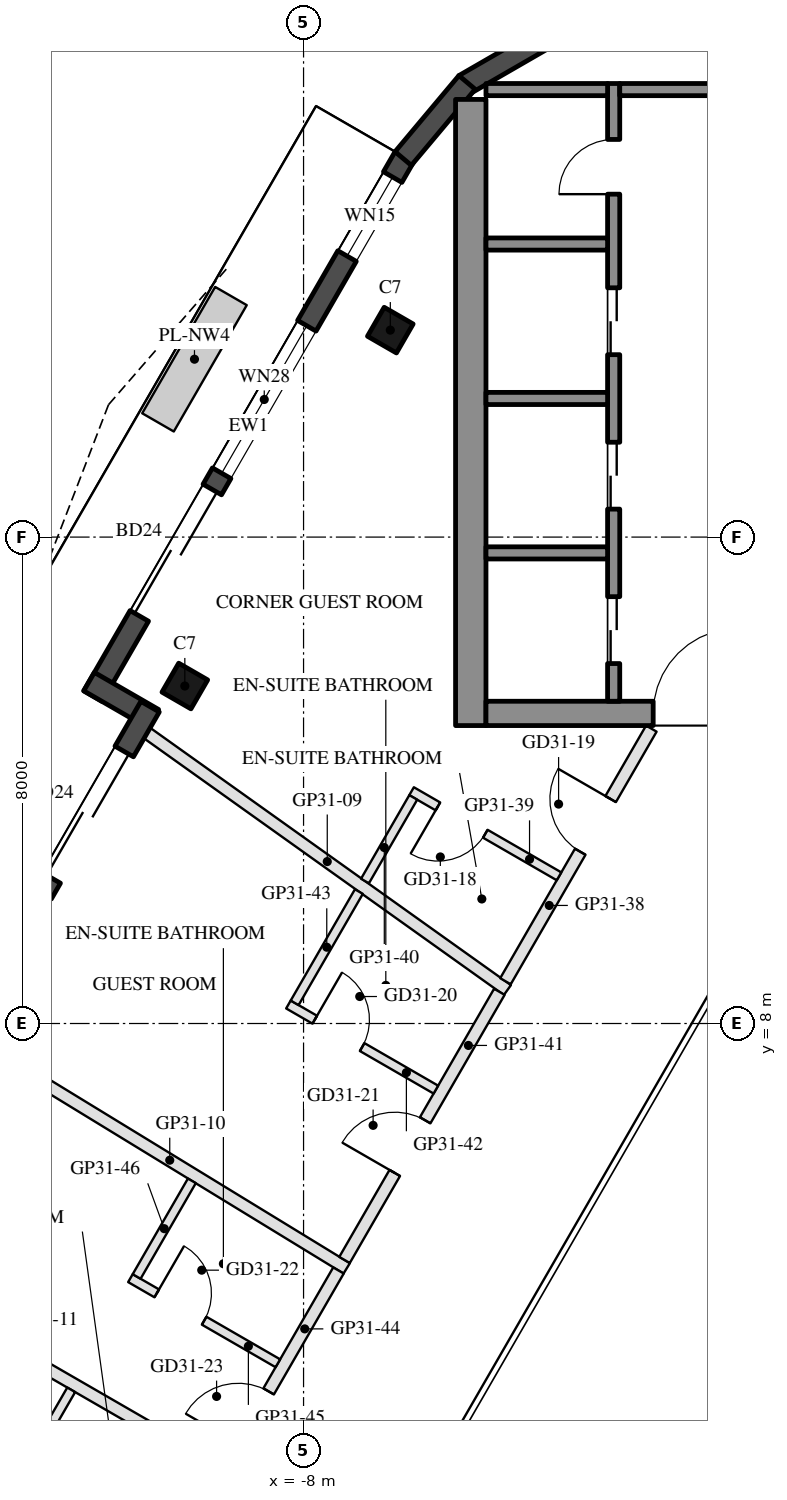
"""IFC4 building model, lengths in metres.
Left out: names, types, materials, properties, quantities, classifications, styles, units other than length and angle.
Written with IfcOpenShell. Run it as: python <this file> out.ifc"""

import sys

from ifc_helpers import new_model, si_unit, direction, frame, frame_2d, origin, origin_2d, place, context, subcontext, project, spatial, rectangle, hollow_rectangle, extrude, boolean, halfspace, element, fill, save


model = new_model("IFC4")
c1 = context("Model", 3, precision=1e-05, world=origin(), true_north=direction((0.0, 1.0)))
c2 = subcontext(c1, "Body", "Model", "MODEL_VIEW")
j1 = project(units=[si_unit("LENGTHUNIT", "METRE"), si_unit("PLANEANGLEUNIT", "RADIAN")], contexts=[c1])
p1 = place(None, origin())
s1 = spatial("IfcSite", under=j1, at=p1, CompositionType="ELEMENT")
p2 = place(p1, origin())
s2 = spatial("IfcBuilding", under=s1, at=p2, CompositionType="ELEMENT")
p3 = place(p2, frame((0.0, 0.0, 302.2)))
s3 = spatial("IfcBuildingStorey", under=s2, at=p3, CompositionType="ELEMENT", Elevation=302.2)
p4 = place(p3, frame((-6.573, 19.404, 0.0), z_axis=(0.0, 0.0, 1.0), x_axis=(0.5, 0.866025403784, 0.0)))
e1 = element("IfcColumn", 1, at=p4, inside=s3, PredefinedType="COLUMN", context=c2, shape_type="SweptSolid", body=[
    boolean("DIFFERENCE", extrude(hollow_rectangle(XDim=0.55, YDim=0.55, WallThickness=0.025, at=origin_2d()), origin(), (0.0, 0.0, 1.0), 3.7), halfspace(frame((0.0, 0.0, 0.04), z_axis=(0.0, 0.0, 1.0), x_axis=(1.0, 0.0, 0.0)), True)),
])
p5 = place(p3, frame((-9.953, 13.551, 0.0), z_axis=(0.0, 0.0, 1.0), x_axis=(0.5, 0.866025403784, 0.0)))
e2 = element("IfcColumn", 2, at=p5, inside=s3, PredefinedType="COLUMN", context=c2, shape_type="SweptSolid", body=[
    boolean("DIFFERENCE", extrude(hollow_rectangle(XDim=0.55, YDim=0.55, WallThickness=0.025, at=origin_2d()), origin(), (0.0, 0.0, 1.0), 3.7), halfspace(frame((0.0, 0.0, 0.034), z_axis=(0.0, 0.0, 1.0), x_axis=(1.0, 0.0, 0.0)), True)),
])
p6 = place(p3, frame((-6.344, 22.251, 0.0), z_axis=(0.0, 0.0, 1.0), x_axis=(-0.499983205548, -0.866035099848, 0.0)))
e3 = element("IfcWall", 3, at=p6, inside=s3, PredefinedType="SOLIDWALL", context=c2, shape_type="SweptSolid", body=[
    extrude(rectangle(XDim=10.239, YDim=0.35, at=frame_2d((5.12, 0.0))), origin(), (0.0, 0.0, 1.0), 3.55),
])
p7 = place(p6, frame((0.381, 0.0, 0.3)))
e4 = element("IfcOpeningElement", 4, at=p7, cuts=e3, PredefinedType="OPENING", context=c2, shape_type="SweptSolid", body=[
    extrude(rectangle(XDim=1.5, YDim=2.65, at=frame_2d((0.75, 1.325))), frame((0.0, 0.185, 0.0), z_axis=(0.0, -1.0, 0.0), x_axis=(1.0, 0.0, 0.0)), (0.0, 0.0, 1.0), 0.37),
])
p8 = place(p6, frame((6.314, 0.0, 0.0)))
e5 = element("IfcOpeningElement", 5, at=p8, cuts=e3, PredefinedType="OPENING", context=c2, shape_type="SweptSolid", body=[
    extrude(rectangle(XDim=2.4, YDim=2.4, at=frame_2d((1.2, 1.2))), frame((0.0, 0.185, 0.0), z_axis=(0.0, -1.0, 0.0), x_axis=(1.0, 0.0, 0.0)), (0.0, 0.0, 1.0), 0.37),
])
p9 = place(p6, frame((3.205, 0.0, 0.3)))
e6 = element("IfcOpeningElement", 6, at=p9, cuts=e3, PredefinedType="OPENING", context=c2, shape_type="SweptSolid", body=[
    extrude(rectangle(XDim=2.8, YDim=2.65, at=frame_2d((1.4, 1.325))), frame((0.0, 0.185, 0.0), z_axis=(0.0, -1.0, 0.0), x_axis=(1.0, 0.0, 0.0)), (0.0, 0.0, 1.0), 0.37),
])
p10 = place(p3, frame((-11.528, 13.623, 0.0), z_axis=(0.0, 0.0, 1.0), x_axis=(0.866005645448, -0.500034220881, 0.0)))
e7 = element("IfcWall", 7, at=p10, inside=s3, PredefinedType="SOLIDWALL", context=c2, shape_type="SweptSolid", body=[
    extrude(rectangle(XDim=1.22, YDim=0.35, at=frame_2d((0.61, 0.0))), origin(), (0.0, 0.0, 1.0), 3.55),
])
p11 = place(p3, frame((-10.524, 13.211, 0.0), z_axis=(0.0, 0.0, 1.0), x_axis=(-0.500008054862, -0.866020753258, 0.0)))
e8 = element("IfcWall", 8, at=p11, inside=s3, PredefinedType="SOLIDWALL", context=c2, shape_type="SweptSolid", body=[
    extrude(rectangle(XDim=5.599, YDim=0.35, at=frame_2d((2.8, 0.0))), origin(), (0.0, 0.0, 1.0), 3.55),
])
p12 = place(p11, frame((0.851, 0.0, 0.0)))
e9 = element("IfcOpeningElement", 9, at=p12, cuts=e8, PredefinedType="OPENING", context=c2, shape_type="SweptSolid", body=[
    extrude(rectangle(XDim=2.4, YDim=2.4, at=frame_2d((1.2, 1.2))), frame((0.0, 0.185, 0.0), z_axis=(0.0, -1.0, 0.0), x_axis=(1.0, 0.0, 0.0)), (0.0, 0.0, 1.0), 0.37),
])
p13 = place(p11, frame((3.551, 0.0, 0.3)))
e10 = element("IfcOpeningElement", 10, at=p13, cuts=e8, PredefinedType="OPENING", context=c2, shape_type="SweptSolid", body=[
    extrude(rectangle(XDim=1.7, YDim=2.65, at=frame_2d((0.85, 1.325))), frame((0.0, 0.185, 0.0), z_axis=(0.0, -1.0, 0.0), x_axis=(1.0, 0.0, 0.0)), (0.0, 0.0, 1.0), 0.37),
])
p14 = place(p3, frame((-3.942, 24.256, 0.0), z_axis=(0.0, 0.0, 1.0), x_axis=(-0.866018903231, -0.500011259119, 0.0)))
e11 = element("IfcWall", 11, at=p14, inside=s3, PredefinedType="SOLIDWALL", context=c2, shape_type="SweptSolid", body=[
    extrude(rectangle(XDim=1.634, YDim=0.35, at=frame_2d((0.817, 0.0))), origin(), (0.0, 0.0, 1.0), 3.55),
])
p15 = place(p3, frame((-5.311, 23.478, 0.0), z_axis=(0.0, 0.0, 1.0), x_axis=(-0.642782014883, -0.766049137682, 0.0)))
e12 = element("IfcWall", 12, at=p15, inside=s3, PredefinedType="SOLIDWALL", context=c2, shape_type="SweptSolid", body=[
    extrude(rectangle(XDim=1.634, YDim=0.35, at=frame_2d((0.817, 0.0))), origin(), (0.0, 0.0, 1.0), 3.55),
])
p16 = place(p3, frame((-5.25, 12.9, 0.0), z_axis=(0.0, 0.0, 1.0), x_axis=(0.0, 1.0, 0.0)))
e13 = element("IfcWall", 13, at=p16, inside=s3, PredefinedType="SHEAR", context=c2, shape_type="SweptSolid", body=[
    extrude(rectangle(XDim=10.299, YDim=0.5, at=frame_2d((5.149, 0.0))), origin(), (0.0, 0.0, 1.0), 3.5),
])
p17 = place(p3, frame((5.0, 13.1, 0.0), z_axis=(0.0, 0.0, 1.0), x_axis=(-1.0, 0.0, 0.0)))
e14 = element("IfcWall", 14, at=p17, inside=s3, PredefinedType="SHEAR", context=c2, shape_type="SweptSolid", body=[
    extrude(rectangle(XDim=10.0, YDim=0.4, at=frame_2d((5.0, 0.0))), origin(), (0.0, 0.0, 1.0), 3.5),
])
p18 = place(p17, frame((3.55, 0.0, 0.0)))
e15 = element("IfcOpeningElement", 15, at=p18, cuts=e14, PredefinedType="OPENING", context=c2, shape_type="SweptSolid", body=[
    extrude(rectangle(XDim=1.1, YDim=2.1, at=frame_2d((0.55, 1.05))), frame((0.0, 0.21, 0.0), z_axis=(0.0, -1.0, 0.0), x_axis=(1.0, 0.0, 0.0)), (0.0, 0.0, 1.0), 0.42),
])
p19 = place(p17, frame((5.85, 0.0, 0.0)))
e16 = element("IfcOpeningElement", 16, at=p19, cuts=e14, PredefinedType="OPENING", context=c2, shape_type="SweptSolid", body=[
    extrude(rectangle(XDim=1.4, YDim=2.1, at=frame_2d((0.7, 1.05))), frame((0.0, 0.21, 0.0), z_axis=(0.0, -1.0, 0.0), x_axis=(1.0, 0.0, 0.0)), (0.0, 0.0, 1.0), 0.42),
])
p20 = place(p3, frame((-2.9, 13.3, 0.0), z_axis=(0.0, 0.0, 1.0), x_axis=(0.0, 1.0, 0.0)))
e17 = element("IfcWall", 17, at=p20, inside=s3, PredefinedType="SHEAR", context=c2, shape_type="SweptSolid", body=[
    extrude(rectangle(XDim=10.16, YDim=0.2, at=frame_2d((5.08, 0.0))), origin(), (0.0, 0.0, 1.0), 3.5),
])
p21 = place(p20, frame((0.62, 0.0, 0.0)))
e18 = element("IfcOpeningElement", 18, at=p21, cuts=e17, PredefinedType="OPENING", context=c2, shape_type="SweptSolid", body=[
    extrude(rectangle(XDim=1.1, YDim=2.1, at=frame_2d((0.55, 1.05))), frame((0.0, 0.11, 0.0), z_axis=(0.0, -1.0, 0.0), x_axis=(1.0, 0.0, 0.0)), (0.0, 0.0, 1.0), 0.22),
])
p22 = place(p20, frame((3.16, 0.0, 0.0)))
e19 = element("IfcOpeningElement", 19, at=p22, cuts=e17, PredefinedType="OPENING", context=c2, shape_type="SweptSolid", body=[
    extrude(rectangle(XDim=1.1, YDim=2.1, at=frame_2d((0.55, 1.05))), frame((0.0, 0.11, 0.0), z_axis=(0.0, -1.0, 0.0), x_axis=(1.0, 0.0, 0.0)), (0.0, 0.0, 1.0), 0.22),
])
p23 = place(p20, frame((5.7, 0.0, 0.0)))
e20 = element("IfcOpeningElement", 20, at=p23, cuts=e17, PredefinedType="OPENING", context=c2, shape_type="SweptSolid", body=[
    extrude(rectangle(XDim=1.1, YDim=2.1, at=frame_2d((0.55, 1.05))), frame((0.0, 0.11, 0.0), z_axis=(0.0, -1.0, 0.0), x_axis=(1.0, 0.0, 0.0)), (0.0, 0.0, 1.0), 0.22),
])
p24 = place(p20, frame((8.34, 0.0, 0.0)))
e21 = element("IfcOpeningElement", 21, at=p24, cuts=e17, PredefinedType="OPENING", context=c2, shape_type="SweptSolid", body=[
    extrude(rectangle(XDim=0.9, YDim=2.1, at=frame_2d((0.45, 1.05))), frame((0.0, 0.11, 0.0), z_axis=(0.0, -1.0, 0.0), x_axis=(1.0, 0.0, 0.0)), (0.0, 0.0, 1.0), 0.22),
])
p25 = place(p3, frame((-1.0, 23.36, 0.0), z_axis=(0.0, 0.0, 1.0), x_axis=(-1.0, 0.0, 0.0)))
e22 = element("IfcWall", 22, at=p25, inside=s3, PredefinedType="SHEAR", context=c2, shape_type="SweptSolid", body=[
    extrude(rectangle(XDim=1.8, YDim=0.2, at=frame_2d((0.9, 0.0))), origin(), (0.0, 0.0, 1.0), 3.5),
])
for number, where, z_axis, x_axis in (
    (23, (-3.0, 15.74, 0.0), (0.0, 0.0, 1.0), (-1.0, 0.0, 0.0)),
    (24, (-3.0, 18.28, 0.0), (0.0, 0.0, 1.0), (-1.0, 0.0, 0.0)),
    (25, (-3.0, 20.82, 0.0), (0.0, 0.0, 1.0), (-1.0, 0.0, 0.0)),
    (26, (-3.0, 23.36, 0.0), (0.0, 0.0, 1.0), (-1.0, 0.0, 0.0)),
):
    element("IfcWall", number, at=place(p3, frame(where, z_axis=z_axis, x_axis=x_axis)), inside=s3, PredefinedType="SHEAR", context=c2, shape_type="SweptSolid", body=[
        extrude(rectangle(XDim=2.0, YDim=0.2, at=frame_2d((1.0, 0.0))), origin(), (0.0, 0.0, 1.0), 3.5),
    ])
p26 = place(p3, frame((-10.573, 12.776, 0.0), z_axis=(0.0, 0.0, 1.0), x_axis=(0.814114082564, -0.580704968613, 0.0)))
e27 = element("IfcWall", 27, at=p26, inside=s3, PredefinedType="PARTITIONING", context=c2, shape_type="SweptSolid", body=[
    extrude(rectangle(XDim=7.278, YDim=0.2, at=frame_2d((3.639, 0.0))), origin(), (0.0, 0.0, 1.0), 3.16),
])
p27 = place(p3, frame((-13.111, 7.531, 0.0), z_axis=(0.0, 0.0, 1.0), x_axis=(0.853158842711, -0.521651214034, 0.0)))
e28 = element("IfcWall", 28, at=p27, inside=s3, PredefinedType="PARTITIONING", context=c2, shape_type="SweptSolid", body=[
    extrude(rectangle(XDim=6.822, YDim=0.2, at=frame_2d((3.411, 0.0))), origin(), (0.0, 0.0, 1.0), 3.1),
])
p28 = place(p3, frame((-16.292, 4.672, 0.0), z_axis=(0.0, 0.0, 1.0), x_axis=(0.866028345359, -0.499994905008, 0.0)))
e29 = element("IfcWall", 29, at=p28, inside=s3, PredefinedType="PARTITIONING", context=c2, shape_type="SweptSolid", body=[
    extrude(rectangle(XDim=8.145, YDim=0.2, at=frame_2d((4.072, 0.0))), origin(), (0.0, 0.0, 1.0), 3.16),
])
p29 = place(p3, frame((-4.679, 8.695, 0.0), z_axis=(0.0, 0.0, 1.0), x_axis=(0.499986760557, 0.866033047446, 0.0)))
e30 = element("IfcWall", 30, at=p29, inside=s3, PredefinedType="PARTITIONING", context=c2, shape_type="SweptSolid", body=[
    extrude(rectangle(XDim=4.798, YDim=0.2, at=frame_2d((2.399, 0.0))), origin(), (0.0, 0.0, 1.0), 3.1),
])
p30 = place(p29, frame((2.46, 0.0, 0.0)))
e31 = element("IfcOpeningElement", 31, at=p30, cuts=e30, PredefinedType="OPENING", context=c2, shape_type="SweptSolid", body=[
    extrude(rectangle(XDim=1.0, YDim=2.1, at=frame_2d((0.5, 1.05))), frame((0.0, 0.11, 0.0), z_axis=(0.0, -1.0, 0.0), x_axis=(1.0, 0.0, 0.0)), (0.0, 0.0, 1.0), 0.22),
])
p31 = place(p3, frame((-3.799, 10.421, 0.0), z_axis=(0.0, 0.0, 1.0), x_axis=(-0.866034573852, 0.49998411664, 0.0)))
e32 = element("IfcWall", 32, at=p31, inside=s3, PredefinedType="PARTITIONING", context=c2, shape_type="SweptSolid", body=[
    extrude(rectangle(XDim=2.8, YDim=0.15, at=frame_2d((1.4, 0.0))), origin(), (0.0, 0.0, 1.0), 3.55),
])
p32 = place(p31, frame((1.4, 0.0, 0.0)))
e33 = element("IfcOpeningElement", 33, at=p32, cuts=e32, PredefinedType="OPENING", context=c2, shape_type="SweptSolid", body=[
    extrude(rectangle(XDim=0.9, YDim=2.1, at=frame_2d((0.45, 1.05))), frame((0.0, 0.085, 0.0), z_axis=(0.0, -1.0, 0.0), x_axis=(1.0, 0.0, 0.0)), (0.0, 0.0, 1.0), 0.17),
])
p33 = place(p3, frame((-6.196, 11.719, 0.0), z_axis=(0.0, 0.0, 1.0), x_axis=(-0.500041894521, -0.86600121462, 0.0)))
e34 = element("IfcWall", 34, at=p33, inside=s3, PredefinedType="PARTITIONING", context=c2, shape_type="SweptSolid", body=[
    extrude(rectangle(XDim=1.588, YDim=0.15, at=frame_2d((0.794, 0.0))), origin(), (0.0, 0.0, 1.0), 3.1),
])
p34 = place(p3, frame((-7.326, 4.111, 0.0), z_axis=(0.0, 0.0, 1.0), x_axis=(0.499970062876, 0.866042687301, 0.0)))
e35 = element("IfcWall", 35, at=p34, inside=s3, PredefinedType="PARTITIONING", context=c2, shape_type="SweptSolid", body=[
    extrude(rectangle(XDim=5.093, YDim=0.2, at=frame_2d((2.546, 0.0))), origin(), (0.0, 0.0, 1.0), 3.1),
])
p35 = place(p34, frame((1.652, 0.0, 0.0)))
e36 = element("IfcOpeningElement", 36, at=p35, cuts=e35, PredefinedType="OPENING", context=c2, shape_type="SweptSolid", body=[
    extrude(rectangle(XDim=1.0, YDim=2.1, at=frame_2d((0.5, 1.05))), frame((0.0, 0.11, 0.0), z_axis=(0.0, -1.0, 0.0), x_axis=(1.0, 0.0, 0.0)), (0.0, 0.0, 1.0), 0.22),
])
p36 = place(p3, frame((-8.249, 8.312, 0.0), z_axis=(0.0, 0.0, 1.0), x_axis=(0.866034573852, -0.49998411664, 0.0)))
e37 = element("IfcWall", 37, at=p36, inside=s3, PredefinedType="PARTITIONING", context=c2, shape_type="SweptSolid", body=[
    extrude(rectangle(XDim=2.8, YDim=0.15, at=frame_2d((1.4, 0.0))), origin(), (0.0, 0.0, 1.0), 3.55),
])
p37 = place(p36, frame((0.5, 0.0, 0.0)))
e38 = element("IfcOpeningElement", 38, at=p37, cuts=e37, PredefinedType="OPENING", context=c2, shape_type="SweptSolid", body=[
    extrude(rectangle(XDim=0.9, YDim=2.1, at=frame_2d((0.45, 1.05))), frame((0.0, 0.085, 0.0), z_axis=(0.0, -1.0, 0.0), x_axis=(1.0, 0.0, 0.0)), (0.0, 0.0, 1.0), 0.17),
])
p38 = place(p3, frame((-7.09, 10.169, 0.0), z_axis=(0.0, 0.0, 1.0), x_axis=(-0.500079259916, -0.865979638214, 0.0)))
e39 = element("IfcWall", 39, at=p38, inside=s3, PredefinedType="PARTITIONING", context=c2, shape_type="SweptSolid", body=[
    extrude(rectangle(XDim=2.113, YDim=0.15, at=frame_2d((1.056, 0.0))), origin(), (0.0, 0.0, 1.0), 3.1),
])
p39 = place(p3, frame((-9.275, 0.736, 0.0), z_axis=(0.0, 0.0, 1.0), x_axis=(0.50002346599, 0.866011855265, 0.0)))
e40 = element("IfcWall", 40, at=p39, inside=s3, PredefinedType="PARTITIONING", context=c2, shape_type="SweptSolid", body=[
    extrude(rectangle(XDim=3.698, YDim=0.2, at=frame_2d((1.849, 0.0))), origin(), (0.0, 0.0, 1.0), 3.1),
])
p40 = place(p39, frame((0.401, 0.0, 0.0)))
e41 = element("IfcOpeningElement", 41, at=p40, cuts=e40, PredefinedType="OPENING", context=c2, shape_type="SweptSolid", body=[
    extrude(rectangle(XDim=1.0, YDim=2.1, at=frame_2d((0.5, 1.05))), frame((0.0, 0.11, 0.0), z_axis=(0.0, -1.0, 0.0), x_axis=(1.0, 0.0, 0.0)), (0.0, 0.0, 1.0), 0.22),
])
p41 = place(p3, frame((-10.847, 3.812, 0.0), z_axis=(0.0, 0.0, 1.0), x_axis=(0.865996816683, -0.500049511043, 0.0)))
e42 = element("IfcWall", 42, at=p41, inside=s3, PredefinedType="PARTITIONING", context=c2, shape_type="SweptSolid", body=[
    extrude(rectangle(XDim=2.8, YDim=0.15, at=frame_2d((1.4, 0.0))), origin(), (0.0, 0.0, 1.0), 3.55),
])
p42 = place(p41, frame((0.5, 0.0, 0.0)))
e43 = element("IfcOpeningElement", 43, at=p42, cuts=e42, PredefinedType="OPENING", context=c2, shape_type="SweptSolid", body=[
    extrude(rectangle(XDim=0.9, YDim=2.1, at=frame_2d((0.45, 1.05))), frame((0.0, 0.085, 0.0), z_axis=(0.0, -1.0, 0.0), x_axis=(1.0, 0.0, 0.0)), (0.0, 0.0, 1.0), 0.17),
])
p43 = place(p3, frame((-9.837, 5.412, 0.0), z_axis=(0.0, 0.0, 1.0), x_axis=(-0.499970715924, -0.866042310294, 0.0)))
e44 = element("IfcWall", 44, at=p43, inside=s3, PredefinedType="PARTITIONING", context=c2, shape_type="SweptSolid", body=[
    extrude(rectangle(XDim=1.816, YDim=0.15, at=frame_2d((0.908, 0.0))), origin(), (0.0, 0.0, 1.0), 3.55),
])
p44 = place(p3, frame((-11.821, 1.975, 0.0), z_axis=(0.0, 0.0, 1.0), x_axis=(-0.500042316284, -0.866000971088, 0.0)))
e45 = element("IfcWall", 45, at=p44, inside=s3, PredefinedType="PARTITIONING", context=c2, shape_type="SweptSolid", body=[
    extrude(rectangle(XDim=1.85, YDim=0.15, at=frame_2d((0.925, 0.0))), origin(), (0.0, 0.0, 1.0), 3.55),
])
p45 = place(p7, origin())
e46 = element("IfcWindow", 46, at=p45, inside=s3, PartitioningType="SINGLE_PANEL", PredefinedType="WINDOW", context=c2, shape_type="SweptSolid", body=[
    extrude(rectangle(XDim=1.5, YDim=2.65, at=frame_2d((0.75, 1.325))), frame((0.0, 0.03, 0.0), z_axis=(0.0, -1.0, 0.0), x_axis=(1.0, 0.0, 0.0)), (0.0, 0.0, 1.0), 0.06),
])
fill(e4, e46)
p46 = place(p8, frame((2.4, 0.0, 0.0), z_axis=(0.0, 0.0, 1.0), x_axis=(-1.0, 0.0, 0.0)))
e47 = element("IfcDoor", 47, at=p46, inside=s3, OperationType="SLIDING_TO_LEFT", PredefinedType="DOOR", context=c2, shape_type="SweptSolid", body=[
    extrude(rectangle(XDim=2.4, YDim=2.4, at=frame_2d((1.2, 1.2))), frame((0.0, 0.025, 0.0), z_axis=(0.0, -1.0, 0.0), x_axis=(1.0, 0.0, 0.0)), (0.0, 0.0, 1.0), 0.05),
])
fill(e5, e47)
p47 = place(p9, origin())
e48 = element("IfcWindow", 48, at=p47, inside=s3, PartitioningType="SINGLE_PANEL", PredefinedType="WINDOW", context=c2, shape_type="SweptSolid", body=[
    extrude(rectangle(XDim=2.8, YDim=2.65, at=frame_2d((1.4, 1.325))), frame((0.0, 0.03, 0.0), z_axis=(0.0, -1.0, 0.0), x_axis=(1.0, 0.0, 0.0)), (0.0, 0.0, 1.0), 0.06),
])
fill(e6, e48)
p48 = place(p12, frame((2.4, 0.0, 0.0), z_axis=(0.0, 0.0, 1.0), x_axis=(-1.0, 0.0, 0.0)))
e49 = element("IfcDoor", 49, at=p48, inside=s3, OperationType="SLIDING_TO_LEFT", PredefinedType="DOOR", context=c2, shape_type="SweptSolid", body=[
    extrude(rectangle(XDim=2.4, YDim=2.4, at=frame_2d((1.2, 1.2))), frame((0.0, 0.025, 0.0), z_axis=(0.0, -1.0, 0.0), x_axis=(1.0, 0.0, 0.0)), (0.0, 0.0, 1.0), 0.05),
])
fill(e9, e49)
p49 = place(p21, origin())
e50 = element("IfcDoor", 50, at=p49, inside=s3, OperationType="DOUBLE_DOOR_SLIDING", PredefinedType="DOOR", context=c2, shape_type="SweptSolid", body=[
    extrude(rectangle(XDim=1.1, YDim=2.1, at=frame_2d((0.55, 1.05))), frame((0.0, 0.025, 0.0), z_axis=(0.0, -1.0, 0.0), x_axis=(1.0, 0.0, 0.0)), (0.0, 0.0, 1.0), 0.05),
])
fill(e18, e50)
p50 = place(p22, origin())
e51 = element("IfcDoor", 51, at=p50, inside=s3, OperationType="DOUBLE_DOOR_SLIDING", PredefinedType="DOOR", context=c2, shape_type="SweptSolid", body=[
    extrude(rectangle(XDim=1.1, YDim=2.1, at=frame_2d((0.55, 1.05))), frame((0.0, 0.025, 0.0), z_axis=(0.0, -1.0, 0.0), x_axis=(1.0, 0.0, 0.0)), (0.0, 0.0, 1.0), 0.05),
])
fill(e19, e51)
p51 = place(p23, origin())
e52 = element("IfcDoor", 52, at=p51, inside=s3, OperationType="DOUBLE_DOOR_SLIDING", PredefinedType="DOOR", context=c2, shape_type="SweptSolid", body=[
    extrude(rectangle(XDim=1.1, YDim=2.1, at=frame_2d((0.55, 1.05))), frame((0.0, 0.025, 0.0), z_axis=(0.0, -1.0, 0.0), x_axis=(1.0, 0.0, 0.0)), (0.0, 0.0, 1.0), 0.05),
])
fill(e20, e52)
p52 = place(p24, origin())
e53 = element("IfcDoor", 53, at=p52, inside=s3, OperationType="SINGLE_SWING_LEFT", PredefinedType="DOOR", context=c2, shape_type="SweptSolid", body=[
    extrude(rectangle(XDim=0.9, YDim=2.1, at=frame_2d((0.45, 1.05))), frame((0.0, 0.025, 0.0), z_axis=(0.0, -1.0, 0.0), x_axis=(1.0, 0.0, 0.0)), (0.0, 0.0, 1.0), 0.05),
])
fill(e21, e53)
p53 = place(p19, frame((1.4, 0.0, 0.0), z_axis=(0.0, 0.0, 1.0), x_axis=(-1.0, 0.0, 0.0)))
e54 = element("IfcDoor", 54, at=p53, inside=s3, OperationType="DOUBLE_DOOR_SINGLE_SWING", PredefinedType="DOOR", context=c2, shape_type="SweptSolid", body=[
    extrude(rectangle(XDim=1.4, YDim=2.1, at=frame_2d((0.7, 1.05))), frame((0.0, 0.025, 0.0), z_axis=(0.0, -1.0, 0.0), x_axis=(1.0, 0.0, 0.0)), (0.0, 0.0, 1.0), 0.05),
])
fill(e16, e54)
p54 = place(p32, origin())
e55 = element("IfcDoor", 55, at=p54, inside=s3, OperationType="SINGLE_SWING_RIGHT", PredefinedType="DOOR", context=c2, shape_type="SweptSolid", body=[
    extrude(rectangle(XDim=0.9, YDim=2.1, at=frame_2d((0.45, 1.05))), frame((0.0, 0.025, 0.0), z_axis=(0.0, -1.0, 0.0), x_axis=(1.0, 0.0, 0.0)), (0.0, 0.0, 1.0), 0.05),
])
fill(e33, e55)
p55 = place(p30, origin())
e56 = element("IfcDoor", 56, at=p55, inside=s3, OperationType="SINGLE_SWING_RIGHT", PredefinedType="DOOR", context=c2, shape_type="SweptSolid", body=[
    extrude(rectangle(XDim=1.0, YDim=2.1, at=frame_2d((0.5, 1.05))), frame((0.0, 0.025, 0.0), z_axis=(0.0, -1.0, 0.0), x_axis=(1.0, 0.0, 0.0)), (0.0, 0.0, 1.0), 0.05),
])
fill(e31, e56)
p56 = place(p37, origin())
e57 = element("IfcDoor", 57, at=p56, inside=s3, OperationType="SINGLE_SWING_LEFT", PredefinedType="DOOR", context=c2, shape_type="SweptSolid", body=[
    extrude(rectangle(XDim=0.9, YDim=2.1, at=frame_2d((0.45, 1.05))), frame((0.0, 0.025, 0.0), z_axis=(0.0, -1.0, 0.0), x_axis=(1.0, 0.0, 0.0)), (0.0, 0.0, 1.0), 0.05),
])
fill(e38, e57)
p57 = place(p35, origin())
e58 = element("IfcDoor", 58, at=p57, inside=s3, OperationType="SINGLE_SWING_LEFT", PredefinedType="DOOR", context=c2, shape_type="SweptSolid", body=[
    extrude(rectangle(XDim=1.0, YDim=2.1, at=frame_2d((0.5, 1.05))), frame((0.0, 0.025, 0.0), z_axis=(0.0, -1.0, 0.0), x_axis=(1.0, 0.0, 0.0)), (0.0, 0.0, 1.0), 0.05),
])
fill(e36, e58)
p58 = place(p42, origin())
e59 = element("IfcDoor", 59, at=p58, inside=s3, OperationType="SINGLE_SWING_LEFT", PredefinedType="DOOR", context=c2, shape_type="SweptSolid", body=[
    extrude(rectangle(XDim=0.9, YDim=2.1, at=frame_2d((0.45, 1.05))), frame((0.0, 0.025, 0.0), z_axis=(0.0, -1.0, 0.0), x_axis=(1.0, 0.0, 0.0)), (0.0, 0.0, 1.0), 0.05),
])
fill(e43, e59)
p59 = place(p40, origin())
e60 = element("IfcDoor", 60, at=p59, inside=s3, OperationType="SINGLE_SWING_LEFT", PredefinedType="DOOR", context=c2, shape_type="SweptSolid", body=[
    extrude(rectangle(XDim=1.0, YDim=2.1, at=frame_2d((0.5, 1.05))), frame((0.0, 0.025, 0.0), z_axis=(0.0, -1.0, 0.0), x_axis=(1.0, 0.0, 0.0)), (0.0, 0.0, 1.0), 0.05),
])
fill(e41, e60)
save(model, sys.argv[1])
